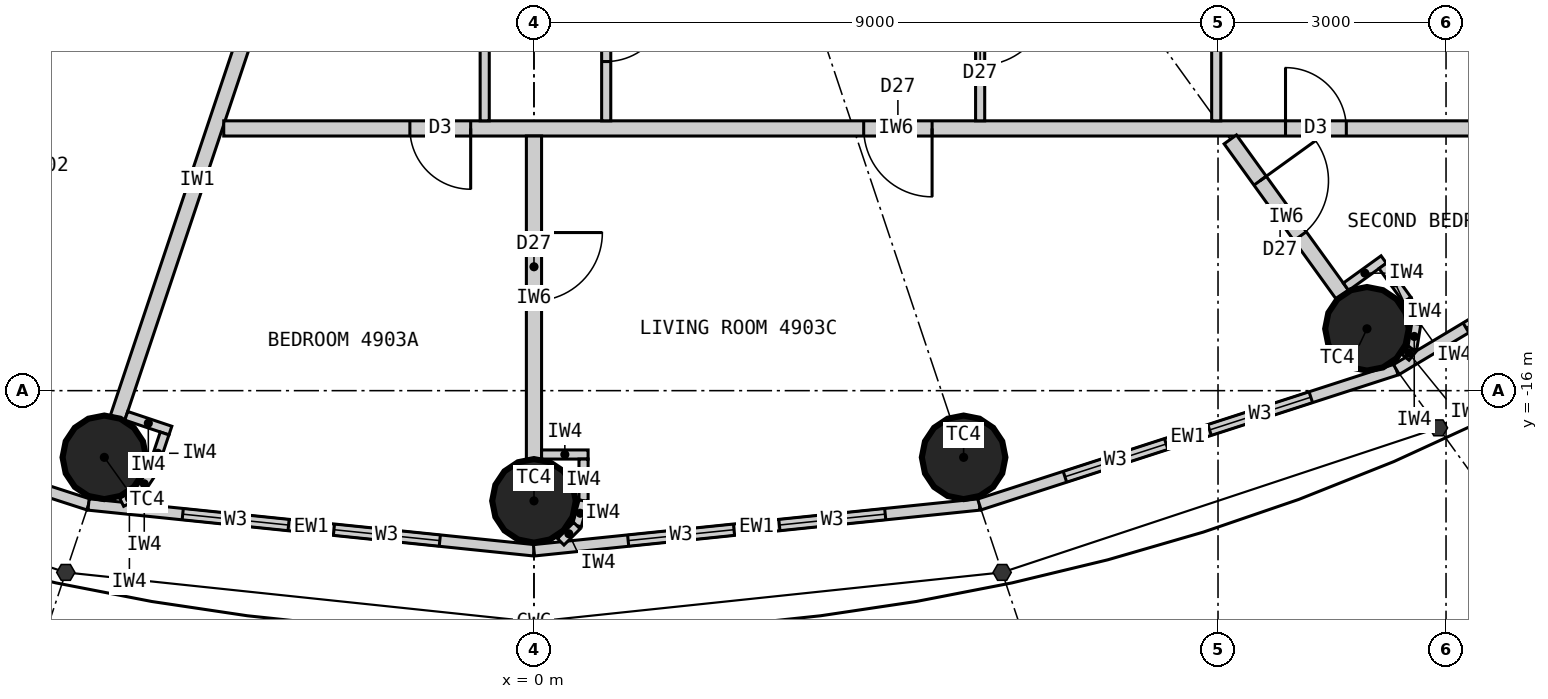
"""IFC4 building model, lengths in metres.
Left out: names, types, materials, properties, quantities, classifications, styles, units other than length and angle.
Written with IfcOpenShell. Run it as: python <this file> out.ifc"""

import sys

from ifc_helpers import new_model, si_unit, direction, frame, frame_2d, origin, origin_2d, place, context, subcontext, project, spatial, rectangle, circle, extrude, clip, halfspace, element, fill, save


model = new_model("IFC4")
c1 = context("Model", 3, precision=1e-05, world=origin(), true_north=direction((0.0, 1.0)))
c2 = subcontext(c1, "Body", "Model", "MODEL_VIEW")
j1 = project(units=[si_unit("LENGTHUNIT", "METRE"), si_unit("PLANEANGLEUNIT", "RADIAN")], contexts=[c1])
p1 = place(None, origin())
s1 = spatial("IfcSite", under=j1, at=p1, CompositionType="ELEMENT")
p2 = place(p1, origin())
s2 = spatial("IfcBuilding", under=s1, at=p2, CompositionType="ELEMENT")
p3 = place(p2, frame((0.0, 0.0, 183.0)))
s3 = spatial("IfcBuildingStorey", under=s2, at=p3, CompositionType="ELEMENT", Elevation=183.0)
for number, where, z_axis, x_axis in (
    (1, (-5.653, -16.877, 0.0), (0.0, 0.0, 1.0), (1.0, 0.0, 0.0)),
    (2, (0.0, -17.45, 0.0), (0.0, 0.0, 1.0), (1.0, 0.0, 0.0)),
    (3, (5.653, -16.877, 0.0), (0.0, 0.0, 1.0), (1.0, 0.0, 0.0)),
    (4, (10.96, -15.186, 0.0), (0.0, 0.0, 1.0), (1.0, 0.0, 0.0)),
):
    element("IfcColumn", number, at=place(p3, frame(where, z_axis=z_axis, x_axis=x_axis)), inside=s3, PredefinedType="COLUMN", context=c2, shape_type="Clipping", body=[
        clip(extrude(circle(Radius=0.55, at=origin_2d()), origin(), (0.0, 0.0, 1.0), 3.3), halfspace(frame((0.0, 0.0, 2.25), z_axis=(0.0, 0.0, 1.0), x_axis=(1.0, 0.0, 0.0)), False)),
    ])
p4 = place(p3, frame((-11.346, -15.722, 0.0), z_axis=(0.0, 0.0, 1.0), x_axis=(0.951432482129, -0.307857486429, 0.0)))
e5 = element("IfcWall", 5, at=p4, inside=s3, PredefinedType="ELEMENTEDWALL", context=c2, shape_type="SweptSolid", body=[
    extrude(rectangle(XDim=5.766, YDim=0.15, at=frame_2d((2.883, 0.0))), origin(), (0.0, 0.0, 1.0), 3.05),
])
p5 = place(p4, frame((1.183, 0.0, 0.9)))
e6 = element("IfcOpeningElement", 6, at=p5, cuts=e5, PredefinedType="OPENING", context=c2, shape_type="SweptSolid", body=[
    extrude(rectangle(XDim=1.4, YDim=1.9, at=frame_2d((0.7, 0.95))), frame((0.0, 0.085, 0.0), z_axis=(0.0, -1.0, 0.0), x_axis=(1.0, 0.0, 0.0)), (0.0, 0.0, 1.0), 0.17),
])
p6 = place(p4, frame((3.183, 0.0, 0.9)))
e7 = element("IfcOpeningElement", 7, at=p6, cuts=e5, PredefinedType="OPENING", context=c2, shape_type="SweptSolid", body=[
    extrude(rectangle(XDim=1.4, YDim=1.9, at=frame_2d((0.7, 0.95))), frame((0.0, 0.085, 0.0), z_axis=(0.0, -1.0, 0.0), x_axis=(1.0, 0.0, 0.0)), (0.0, 0.0, 1.0), 0.17),
])
p7 = place(p3, frame((-5.86, -17.497, 0.0), z_axis=(0.0, 0.0, 1.0), x_axis=(0.994751738032, -0.102318032045, 0.0)))
e8 = element("IfcWall", 8, at=p7, inside=s3, PredefinedType="ELEMENTEDWALL", context=c2, shape_type="SweptSolid", body=[
    extrude(rectangle(XDim=5.891, YDim=0.15, at=frame_2d((2.946, 0.0))), origin(), (0.0, 0.0, 1.0), 3.05),
])
p8 = place(p7, frame((1.246, 0.0, 0.9)))
e9 = element("IfcOpeningElement", 9, at=p8, cuts=e8, PredefinedType="OPENING", context=c2, shape_type="SweptSolid", body=[
    extrude(rectangle(XDim=1.4, YDim=1.9, at=frame_2d((0.7, 0.95))), frame((0.0, 0.085, 0.0), z_axis=(0.0, -1.0, 0.0), x_axis=(1.0, 0.0, 0.0)), (0.0, 0.0, 1.0), 0.17),
])
p9 = place(p7, frame((3.246, 0.0, 0.9)))
e10 = element("IfcOpeningElement", 10, at=p9, cuts=e8, PredefinedType="OPENING", context=c2, shape_type="SweptSolid", body=[
    extrude(rectangle(XDim=1.4, YDim=1.9, at=frame_2d((0.7, 0.95))), frame((0.0, 0.085, 0.0), z_axis=(0.0, -1.0, 0.0), x_axis=(1.0, 0.0, 0.0)), (0.0, 0.0, 1.0), 0.17),
])
p10 = place(p3, frame((0.0, -18.1, 0.0), z_axis=(0.0, 0.0, 1.0), x_axis=(0.994751738032, 0.102318032045, 0.0)))
e11 = element("IfcWall", 11, at=p10, inside=s3, PredefinedType="ELEMENTEDWALL", context=c2, shape_type="SweptSolid", body=[
    extrude(rectangle(XDim=5.891, YDim=0.15, at=frame_2d((2.946, 0.0))), origin(), (0.0, 0.0, 1.0), 3.05),
])
p11 = place(p10, frame((1.246, 0.0, 0.9)))
e12 = element("IfcOpeningElement", 12, at=p11, cuts=e11, PredefinedType="OPENING", context=c2, shape_type="SweptSolid", body=[
    extrude(rectangle(XDim=1.4, YDim=1.9, at=frame_2d((0.7, 0.95))), frame((0.0, 0.085, 0.0), z_axis=(0.0, -1.0, 0.0), x_axis=(1.0, 0.0, 0.0)), (0.0, 0.0, 1.0), 0.17),
])
p12 = place(p10, frame((3.246, 0.0, 0.9)))
e13 = element("IfcOpeningElement", 13, at=p12, cuts=e11, PredefinedType="OPENING", context=c2, shape_type="SweptSolid", body=[
    extrude(rectangle(XDim=1.4, YDim=1.9, at=frame_2d((0.7, 0.95))), frame((0.0, 0.085, 0.0), z_axis=(0.0, -1.0, 0.0), x_axis=(1.0, 0.0, 0.0)), (0.0, 0.0, 1.0), 0.17),
])
p13 = place(p3, frame((5.86, -17.497, 0.0), z_axis=(0.0, 0.0, 1.0), x_axis=(0.951432482129, 0.307857486429, 0.0)))
e14 = element("IfcWall", 14, at=p13, inside=s3, PredefinedType="ELEMENTEDWALL", context=c2, shape_type="SweptSolid", body=[
    extrude(rectangle(XDim=5.766, YDim=0.15, at=frame_2d((2.883, 0.0))), origin(), (0.0, 0.0, 1.0), 3.05),
])
p14 = place(p13, frame((1.183, 0.0, 0.9)))
e15 = element("IfcOpeningElement", 15, at=p14, cuts=e14, PredefinedType="OPENING", context=c2, shape_type="SweptSolid", body=[
    extrude(rectangle(XDim=1.4, YDim=1.9, at=frame_2d((0.7, 0.95))), frame((0.0, 0.085, 0.0), z_axis=(0.0, -1.0, 0.0), x_axis=(1.0, 0.0, 0.0)), (0.0, 0.0, 1.0), 0.17),
])
p15 = place(p13, frame((3.183, 0.0, 0.9)))
e16 = element("IfcOpeningElement", 16, at=p15, cuts=e14, PredefinedType="OPENING", context=c2, shape_type="SweptSolid", body=[
    extrude(rectangle(XDim=1.4, YDim=1.9, at=frame_2d((0.7, 0.95))), frame((0.0, 0.085, 0.0), z_axis=(0.0, -1.0, 0.0), x_axis=(1.0, 0.0, 0.0)), (0.0, 0.0, 1.0), 0.17),
])
p16 = place(p3, frame((11.346, -15.722, 0.0), z_axis=(0.0, 0.0, 1.0), x_axis=(0.857695199231, 0.514158482587, 0.0)))
e17 = element("IfcWall", 17, at=p16, inside=s3, PredefinedType="ELEMENTEDWALL", context=c2, shape_type="SweptSolid", body=[
    extrude(rectangle(XDim=5.536, YDim=0.15, at=frame_2d((2.768, 0.0))), origin(), (0.0, 0.0, 1.0), 3.05),
])
p17 = place(p16, frame((1.068, 0.0, 0.9)))
e18 = element("IfcOpeningElement", 18, at=p17, cuts=e17, PredefinedType="OPENING", context=c2, shape_type="SweptSolid", body=[
    extrude(rectangle(XDim=1.4, YDim=1.9, at=frame_2d((0.7, 0.95))), frame((0.0, 0.085, 0.0), z_axis=(0.0, -1.0, 0.0), x_axis=(1.0, 0.0, 0.0)), (0.0, 0.0, 1.0), 0.17),
])
p18 = place(p16, frame((3.068, 0.0, 0.9)))
e19 = element("IfcOpeningElement", 19, at=p18, cuts=e17, PredefinedType="OPENING", context=c2, shape_type="SweptSolid", body=[
    extrude(rectangle(XDim=1.4, YDim=1.9, at=frame_2d((0.7, 0.95))), frame((0.0, 0.085, 0.0), z_axis=(0.0, -1.0, 0.0), x_axis=(1.0, 0.0, 0.0)), (0.0, 0.0, 1.0), 0.17),
])
p19 = place(p3, frame((-3.383, -10.1, 0.0), z_axis=(0.0, 0.0, 1.0), x_axis=(-0.317615120474, -0.948219718866, 0.0)))
e20 = element("IfcWall", 20, at=p19, inside=s3, PredefinedType="PARTITIONING", context=c2, shape_type="SweptSolid", body=[
    extrude(rectangle(XDim=6.597, YDim=0.2, at=frame_2d((3.299, 0.0))), origin(), (0.0, 0.0, 1.0), 2.15),
])
p20 = place(p3, frame((-4.082, -12.55, 0.0), z_axis=(0.0, 0.0, 1.0), x_axis=(1.0, 0.0, 0.0)))
e21 = element("IfcWall", 21, at=p20, inside=s3, PredefinedType="PARTITIONING", context=c2, shape_type="SweptSolid", body=[
    extrude(rectangle(XDim=17.691, YDim=0.2, at=frame_2d((8.845, 0.0))), origin(), (0.0, 0.0, 1.0), 3.05),
])
p21 = place(p20, frame((2.449, 0.0, 0.0)))
e22 = element("IfcOpeningElement", 22, at=p21, cuts=e21, PredefinedType="OPENING", context=c2, shape_type="SweptSolid", body=[
    extrude(rectangle(XDim=0.8, YDim=2.1, at=frame_2d((0.4, 1.05))), frame((0.0, 0.11, 0.0), z_axis=(0.0, -1.0, 0.0), x_axis=(1.0, 0.0, 0.0)), (0.0, 0.0, 1.0), 0.22),
])
p22 = place(p20, frame((13.97, 0.0, 0.0)))
e23 = element("IfcOpeningElement", 23, at=p22, cuts=e21, PredefinedType="OPENING", context=c2, shape_type="SweptSolid", body=[
    extrude(rectangle(XDim=0.8, YDim=2.1, at=frame_2d((0.4, 1.05))), frame((0.0, 0.11, 0.0), z_axis=(0.0, -1.0, 0.0), x_axis=(1.0, 0.0, 0.0)), (0.0, 0.0, 1.0), 0.22),
])
p23 = place(p20, frame((8.42, 0.0, 0.0)))
e24 = element("IfcOpeningElement", 24, at=p23, cuts=e21, PredefinedType="OPENING", context=c2, shape_type="SweptSolid", body=[
    extrude(rectangle(XDim=0.9, YDim=2.1, at=frame_2d((0.45, 1.05))), frame((0.0, 0.11, 0.0), z_axis=(0.0, -1.0, 0.0), x_axis=(1.0, 0.0, 0.0)), (0.0, 0.0, 1.0), 0.22),
])
p24 = place(p3, frame((0.0, -12.65, 0.0), z_axis=(0.0, 0.0, 1.0), x_axis=(0.0, -1.0, 0.0)))
e25 = element("IfcWall", 25, at=p24, inside=s3, PredefinedType="PARTITIONING", context=c2, shape_type="SweptSolid", body=[
    extrude(rectangle(XDim=4.25, YDim=0.2, at=frame_2d((2.125, 0.0))), origin(), (0.0, 0.0, 1.0), 2.25),
])
p25 = place(p24, frame((1.27, 0.0, 0.0)))
e26 = element("IfcOpeningElement", 26, at=p25, cuts=e25, PredefinedType="OPENING", context=c2, shape_type="SweptSolid", body=[
    extrude(rectangle(XDim=0.9, YDim=2.1, at=frame_2d((0.45, 1.05))), frame((0.0, 0.11, 0.0), z_axis=(0.0, -1.0, 0.0), x_axis=(1.0, 0.0, 0.0)), (0.0, 0.0, 1.0), 0.22),
])
p26 = place(p3, frame((9.162, -12.695, 0.0), z_axis=(0.0, 0.0, 1.0), x_axis=(0.585204311739, -0.810885881935, 0.0)))
e27 = element("IfcWall", 27, at=p26, inside=s3, PredefinedType="PARTITIONING", context=c2, shape_type="SweptSolid", body=[
    extrude(rectangle(XDim=2.523, YDim=0.2, at=frame_2d((1.261, 0.0))), origin(), (0.0, 0.0, 1.0), 2.15),
])
p27 = place(p26, frame((0.67, 0.0, 0.0)))
e28 = element("IfcOpeningElement", 28, at=p27, cuts=e27, PredefinedType="OPENING", context=c2, shape_type="SweptSolid", body=[
    extrude(rectangle(XDim=0.9, YDim=2.1, at=frame_2d((0.45, 1.05))), frame((0.0, 0.11, 0.0), z_axis=(0.0, -1.0, 0.0), x_axis=(1.0, 0.0, 0.0)), (0.0, 0.0, 1.0), 0.22),
])
p28 = place(p3, frame((-0.648, -10.1, 0.0), z_axis=(0.0, 0.0, 1.0), x_axis=(0.0, -1.0, 0.0)))
e29 = element("IfcWall", 29, at=p28, inside=s3, PredefinedType="PARTITIONING", context=c2, shape_type="SweptSolid", body=[
    extrude(rectangle(XDim=2.35, YDim=0.12, at=frame_2d((1.175, 0.0))), origin(), (0.0, 0.0, 1.0), 3.05),
])
p29 = place(p3, frame((0.95, -10.1, 0.0), z_axis=(0.0, 0.0, 1.0), x_axis=(0.0, -1.0, 0.0)))
e30 = element("IfcWall", 30, at=p29, inside=s3, PredefinedType="PARTITIONING", context=c2, shape_type="SweptSolid", body=[
    extrude(rectangle(XDim=2.35, YDim=0.12, at=frame_2d((1.175, 0.0))), origin(), (0.0, 0.0, 1.0), 3.05),
])
p30 = place(p29, frame((0.77, 0.0, 0.0)))
e31 = element("IfcOpeningElement", 31, at=p30, cuts=e30, PredefinedType="OPENING", context=c2, shape_type="SweptSolid", body=[
    extrude(rectangle(XDim=0.8, YDim=2.1, at=frame_2d((0.4, 1.05))), frame((0.0, 0.07, 0.0), z_axis=(0.0, -1.0, 0.0), x_axis=(1.0, 0.0, 0.0)), (0.0, 0.0, 1.0), 0.14),
])
p31 = place(p3, frame((5.87, -10.1, 0.0), z_axis=(0.0, 0.0, 1.0), x_axis=(0.0, -1.0, 0.0)))
e32 = element("IfcWall", 32, at=p31, inside=s3, PredefinedType="PARTITIONING", context=c2, shape_type="SweptSolid", body=[
    extrude(rectangle(XDim=2.35, YDim=0.12, at=frame_2d((1.175, 0.0))), origin(), (0.0, 0.0, 1.0), 3.05),
])
p32 = place(p31, frame((0.72, 0.0, 0.0)))
e33 = element("IfcOpeningElement", 33, at=p32, cuts=e32, PredefinedType="OPENING", context=c2, shape_type="SweptSolid", body=[
    extrude(rectangle(XDim=0.9, YDim=2.1, at=frame_2d((0.45, 1.05))), frame((0.0, 0.07, 0.0), z_axis=(0.0, -1.0, 0.0), x_axis=(1.0, 0.0, 0.0)), (0.0, 0.0, 1.0), 0.14),
])
p33 = place(p3, frame((8.977, -10.1, 0.0), z_axis=(0.0, 0.0, 1.0), x_axis=(0.0, -1.0, 0.0)))
e34 = element("IfcWall", 34, at=p33, inside=s3, PredefinedType="PARTITIONING", context=c2, shape_type="SweptSolid", body=[
    extrude(rectangle(XDim=2.35, YDim=0.12, at=frame_2d((1.175, 0.0))), origin(), (0.0, 0.0, 1.0), 3.05),
])
p34 = place(p3, frame((-5.364, -16.331, 0.0), z_axis=(0.0, 0.0, 1.0), x_axis=(0.948283770087, -0.317423835572, 0.0)))
e35 = element("IfcWall", 35, at=p34, inside=s3, PredefinedType="PARTITIONING", context=c2, shape_type="SweptSolid", body=[
    extrude(rectangle(XDim=0.612, YDim=0.12, at=frame_2d((0.306, 0.0))), origin(), (0.0, 0.0, 1.0), 3.05),
])
p35 = place(p3, frame((-4.86, -16.563, 0.0), z_axis=(0.0, 0.0, 1.0), x_axis=(-0.317825321803, -0.948149284038, 0.0)))
e36 = element("IfcWall", 36, at=p35, inside=s3, PredefinedType="PARTITIONING", context=c2, shape_type="SweptSolid", body=[
    extrude(rectangle(XDim=0.55, YDim=0.12, at=frame_2d((0.275, 0.0))), origin(), (0.0, 0.0, 1.0), 3.05),
])
p36 = place(p3, frame((-5.034, -17.084, 0.0), z_axis=(0.0, 0.0, 1.0), x_axis=(-0.552362205726, -0.833604218851, 0.0)))
e37 = element("IfcWall", 37, at=p36, inside=s3, PredefinedType="PARTITIONING", context=c2, shape_type="SweptSolid", body=[
    extrude(rectangle(XDim=0.338, YDim=0.12, at=frame_2d((0.169, 0.0))), origin(), (0.0, 0.0, 1.0), 3.05),
])
p37 = place(p3, frame((-5.221, -17.366, 0.0), z_axis=(0.0, 0.0, 1.0), x_axis=(-0.895067896179, -0.445929883759, 0.0)))
e38 = element("IfcWall", 38, at=p37, inside=s3, PredefinedType="PARTITIONING", context=c2, shape_type="SweptSolid", body=[
    extrude(rectangle(XDim=0.228, YDim=0.12, at=frame_2d((0.114, 0.0))), origin(), (0.0, 0.0, 1.0), 3.05),
])
p38 = place(p3, frame((0.1, -16.84, 0.0), z_axis=(0.0, 0.0, 1.0), x_axis=(1.0, 0.0, 0.0)))
e39 = element("IfcWall", 39, at=p38, inside=s3, PredefinedType="PARTITIONING", context=c2, shape_type="SweptSolid", body=[
    extrude(rectangle(XDim=0.612, YDim=0.12, at=frame_2d((0.306, 0.0))), origin(), (0.0, 0.0, 1.0), 3.05),
])
p39 = place(p3, frame((0.652, -16.9, 0.0), z_axis=(0.0, 0.0, 1.0), x_axis=(0.0, -1.0, 0.0)))
e40 = element("IfcWall", 40, at=p39, inside=s3, PredefinedType="PARTITIONING", context=c2, shape_type="SweptSolid", body=[
    extrude(rectangle(XDim=0.55, YDim=0.12, at=frame_2d((0.275, 0.0))), origin(), (0.0, 0.0, 1.0), 3.05),
])
p40 = place(p3, frame((0.652, -17.45, 0.0), z_axis=(0.0, 0.0, 1.0), x_axis=(-0.258832454679, -0.965922233104, 0.0)))
e41 = element("IfcWall", 41, at=p40, inside=s3, PredefinedType="PARTITIONING", context=c2, shape_type="SweptSolid", body=[
    extrude(rectangle(XDim=0.338, YDim=0.12, at=frame_2d((0.169, 0.0))), origin(), (0.0, 0.0, 1.0), 3.05),
])
p41 = place(p3, frame((0.565, -17.776, 0.0), z_axis=(0.0, 0.0, 1.0), x_axis=(-0.707106781187, -0.707106781187, 0.0)))
e42 = element("IfcWall", 42, at=p41, inside=s3, PredefinedType="PARTITIONING", context=c2, shape_type="SweptSolid", body=[
    extrude(rectangle(XDim=0.301, YDim=0.12, at=frame_2d((0.15, 0.0))), origin(), (0.0, 0.0, 1.0), 3.05),
])
p42 = place(p3, frame((10.684, -14.633, 0.0), z_axis=(0.0, 0.0, 1.0), x_axis=(0.810921075692, 0.585155542568, 0.0)))
e43 = element("IfcWall", 43, at=p42, inside=s3, PredefinedType="PARTITIONING", context=c2, shape_type="SweptSolid", body=[
    extrude(rectangle(XDim=0.612, YDim=0.12, at=frame_2d((0.306, 0.0))), origin(), (0.0, 0.0, 1.0), 3.05),
])
p43 = place(p3, frame((11.167, -14.359, 0.0), z_axis=(0.0, 0.0, 1.0), x_axis=(0.585263549799, -0.810843127415, 0.0)))
e44 = element("IfcWall", 44, at=p43, inside=s3, PredefinedType="PARTITIONING", context=c2, shape_type="SweptSolid", body=[
    extrude(rectangle(XDim=0.55, YDim=0.12, at=frame_2d((0.275, 0.0))), origin(), (0.0, 0.0, 1.0), 3.05),
])
for number, where, z_axis, x_axis in (
    (45, (11.489, -14.804, 0.0), (0.0, 0.0, 1.0), (0.356, -0.935, 0.0)),
    (46, (11.609, -15.12, 0.0), (0.0, 0.0, 1.0), (-0.16, -0.987, 0.0)),
):
    element("IfcWall", number, at=place(p3, frame(where, z_axis=z_axis, x_axis=x_axis)), inside=s3, PredefinedType="PARTITIONING", context=c2, shape_type="SweptSolid", body=[
        extrude(rectangle(XDim=0.338, YDim=0.12, at=frame_2d((0.169, 0.0))), origin(), (0.0, 0.0, 1.0), 3.05),
    ])
p44 = place(p3, frame((11.555, -15.453, 0.0), z_axis=(0.0, 0.0, 1.0), x_axis=(-0.631711901025, -0.775203246964, 0.0)))
e47 = element("IfcWall", 47, at=p44, inside=s3, PredefinedType="PARTITIONING", context=c2, shape_type="SweptSolid", body=[
    extrude(rectangle(XDim=0.139, YDim=0.12, at=frame_2d((0.07, 0.0))), origin(), (0.0, 0.0, 1.0), 3.05),
])
p45 = place(p8, origin())
e48 = element("IfcWindow", 48, at=p45, inside=s3, PartitioningType="SINGLE_PANEL", PredefinedType="WINDOW", context=c2, shape_type="SweptSolid", body=[
    extrude(rectangle(XDim=1.4, YDim=1.9, at=frame_2d((0.7, 0.95))), frame((0.0, 0.03, 0.0), z_axis=(0.0, -1.0, 0.0), x_axis=(1.0, 0.0, 0.0)), (0.0, 0.0, 1.0), 0.06),
])
fill(e9, e48)
p46 = place(p9, origin())
e49 = element("IfcWindow", 49, at=p46, inside=s3, PartitioningType="SINGLE_PANEL", PredefinedType="WINDOW", context=c2, shape_type="SweptSolid", body=[
    extrude(rectangle(XDim=1.4, YDim=1.9, at=frame_2d((0.7, 0.95))), frame((0.0, 0.03, 0.0), z_axis=(0.0, -1.0, 0.0), x_axis=(1.0, 0.0, 0.0)), (0.0, 0.0, 1.0), 0.06),
])
fill(e10, e49)
p47 = place(p11, origin())
e50 = element("IfcWindow", 50, at=p47, inside=s3, PartitioningType="SINGLE_PANEL", PredefinedType="WINDOW", context=c2, shape_type="SweptSolid", body=[
    extrude(rectangle(XDim=1.4, YDim=1.9, at=frame_2d((0.7, 0.95))), frame((0.0, 0.03, 0.0), z_axis=(0.0, -1.0, 0.0), x_axis=(1.0, 0.0, 0.0)), (0.0, 0.0, 1.0), 0.06),
])
fill(e12, e50)
p48 = place(p12, origin())
e51 = element("IfcWindow", 51, at=p48, inside=s3, PartitioningType="SINGLE_PANEL", PredefinedType="WINDOW", context=c2, shape_type="SweptSolid", body=[
    extrude(rectangle(XDim=1.4, YDim=1.9, at=frame_2d((0.7, 0.95))), frame((0.0, 0.03, 0.0), z_axis=(0.0, -1.0, 0.0), x_axis=(1.0, 0.0, 0.0)), (0.0, 0.0, 1.0), 0.06),
])
fill(e13, e51)
p49 = place(p14, origin())
e52 = element("IfcWindow", 52, at=p49, inside=s3, PartitioningType="SINGLE_PANEL", PredefinedType="WINDOW", context=c2, shape_type="SweptSolid", body=[
    extrude(rectangle(XDim=1.4, YDim=1.9, at=frame_2d((0.7, 0.95))), frame((0.0, 0.03, 0.0), z_axis=(0.0, -1.0, 0.0), x_axis=(1.0, 0.0, 0.0)), (0.0, 0.0, 1.0), 0.06),
])
fill(e15, e52)
p50 = place(p15, origin())
e53 = element("IfcWindow", 53, at=p50, inside=s3, PartitioningType="SINGLE_PANEL", PredefinedType="WINDOW", context=c2, shape_type="SweptSolid", body=[
    extrude(rectangle(XDim=1.4, YDim=1.9, at=frame_2d((0.7, 0.95))), frame((0.0, 0.03, 0.0), z_axis=(0.0, -1.0, 0.0), x_axis=(1.0, 0.0, 0.0)), (0.0, 0.0, 1.0), 0.06),
])
fill(e16, e53)
p51 = place(p17, origin())
e54 = element("IfcWindow", 54, at=p51, inside=s3, PartitioningType="SINGLE_PANEL", PredefinedType="WINDOW", context=c2, shape_type="SweptSolid", body=[
    extrude(rectangle(XDim=1.4, YDim=1.9, at=frame_2d((0.7, 0.95))), frame((0.0, 0.03, 0.0), z_axis=(0.0, -1.0, 0.0), x_axis=(1.0, 0.0, 0.0)), (0.0, 0.0, 1.0), 0.06),
])
fill(e18, e54)
p52 = place(p21, origin())
e55 = element("IfcDoor", 55, at=p52, inside=s3, OperationType="SINGLE_SWING_RIGHT", PredefinedType="DOOR", context=c2, shape_type="SweptSolid", body=[
    extrude(rectangle(XDim=0.8, YDim=2.1, at=frame_2d((0.4, 1.05))), frame((0.0, 0.025, 0.0), z_axis=(0.0, -1.0, 0.0), x_axis=(1.0, 0.0, 0.0)), (0.0, 0.0, 1.0), 0.05),
])
fill(e22, e55)
p53 = place(p30, origin())
e56 = element("IfcDoor", 56, at=p53, inside=s3, OperationType="SINGLE_SWING_LEFT", PredefinedType="DOOR", context=c2, shape_type="SweptSolid", body=[
    extrude(rectangle(XDim=0.8, YDim=2.1, at=frame_2d((0.4, 1.05))), frame((0.0, 0.025, 0.0), z_axis=(0.0, -1.0, 0.0), x_axis=(1.0, 0.0, 0.0)), (0.0, 0.0, 1.0), 0.05),
])
fill(e31, e56)
p54 = place(p32, origin())
e57 = element("IfcDoor", 57, at=p54, inside=s3, OperationType="SINGLE_SWING_LEFT", PredefinedType="DOOR", context=c2, shape_type="SweptSolid", body=[
    extrude(rectangle(XDim=0.9, YDim=2.1, at=frame_2d((0.45, 1.05))), frame((0.0, 0.025, 0.0), z_axis=(0.0, -1.0, 0.0), x_axis=(1.0, 0.0, 0.0)), (0.0, 0.0, 1.0), 0.05),
])
fill(e33, e57)
p55 = place(p22, origin())
e58 = element("IfcDoor", 58, at=p55, inside=s3, OperationType="SINGLE_SWING_LEFT", PredefinedType="DOOR", context=c2, shape_type="SweptSolid", body=[
    extrude(rectangle(XDim=0.8, YDim=2.1, at=frame_2d((0.4, 1.05))), frame((0.0, 0.025, 0.0), z_axis=(0.0, -1.0, 0.0), x_axis=(1.0, 0.0, 0.0)), (0.0, 0.0, 1.0), 0.05),
])
fill(e23, e58)
p56 = place(p23, origin())
e59 = element("IfcDoor", 59, at=p56, inside=s3, OperationType="SINGLE_SWING_RIGHT", PredefinedType="DOOR", context=c2, shape_type="SweptSolid", body=[
    extrude(rectangle(XDim=0.9, YDim=2.1, at=frame_2d((0.45, 1.05))), frame((0.0, 0.025, 0.0), z_axis=(0.0, -1.0, 0.0), x_axis=(1.0, 0.0, 0.0)), (0.0, 0.0, 1.0), 0.05),
])
fill(e24, e59)
p57 = place(p25, origin())
e60 = element("IfcDoor", 60, at=p57, inside=s3, OperationType="SINGLE_SWING_LEFT", PredefinedType="DOOR", context=c2, shape_type="SweptSolid", body=[
    extrude(rectangle(XDim=0.9, YDim=2.1, at=frame_2d((0.45, 1.05))), frame((0.0, 0.025, 0.0), z_axis=(0.0, -1.0, 0.0), x_axis=(1.0, 0.0, 0.0)), (0.0, 0.0, 1.0), 0.05),
])
fill(e26, e60)
p58 = place(p27, origin())
e61 = element("IfcDoor", 61, at=p58, inside=s3, OperationType="SINGLE_SWING_LEFT", PredefinedType="DOOR", context=c2, shape_type="SweptSolid", body=[
    extrude(rectangle(XDim=0.9, YDim=2.1, at=frame_2d((0.45, 1.05))), frame((0.0, 0.025, 0.0), z_axis=(0.0, -1.0, 0.0), x_axis=(1.0, 0.0, 0.0)), (0.0, 0.0, 1.0), 0.05),
])
fill(e28, e61)
save(model, sys.argv[1])
